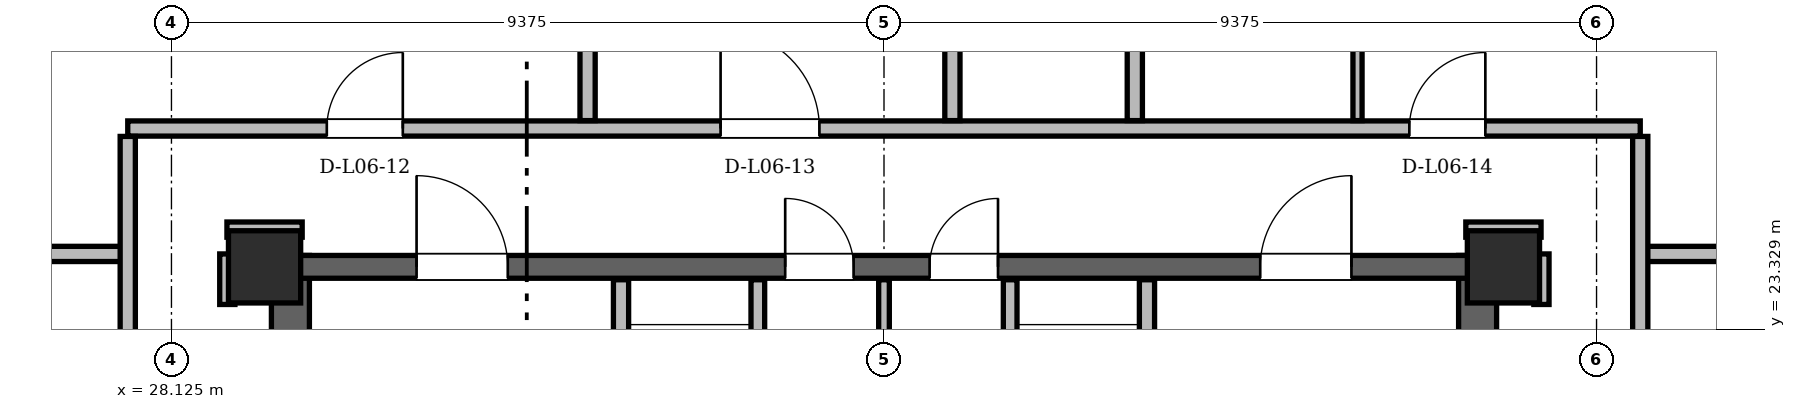
"""IFC4 building model, lengths in metres.
Left out: names, types, materials, properties, quantities, classifications, styles, units other than length and angle.
Written with IfcOpenShell. Run it as: python <this file> out.ifc"""

import sys

from ifc_helpers import new_model, si_unit, direction, frame, frame_2d, origin, origin_2d, place, context, subcontext, project, spatial, rectangle, hollow_rectangle, extrude, element, fill, save


model = new_model("IFC4")
c1 = context("Model", 3, precision=1e-05, world=origin(), true_north=direction((0.0, 1.0)))
c2 = subcontext(c1, "Body", "Model", "MODEL_VIEW")
j1 = project(units=[si_unit("LENGTHUNIT", "METRE"), si_unit("PLANEANGLEUNIT", "RADIAN")], contexts=[c1])
p1 = place(None, origin())
s1 = spatial("IfcSite", under=j1, at=p1, CompositionType="ELEMENT")
p2 = place(p1, origin())
s2 = spatial("IfcBuilding", under=s1, at=p2, CompositionType="ELEMENT")
p3 = place(p2, frame((0.0, 0.0, 27.3)))
s3 = spatial("IfcBuildingStorey", under=s2, at=p3, CompositionType="ELEMENT", Elevation=27.3)
for number, where, z_axis, x_axis in (
    (1, (45.65, 24.15, 0.0), (0.0, 0.0, 1.0), (1.0, 0.0, 0.0)),
    (2, (29.35, 24.15, 0.0), (0.0, 0.0, 1.0), (1.0, 0.0, 0.0)),
):
    element("IfcColumn", number, at=place(p3, frame(where, z_axis=z_axis, x_axis=x_axis)), inside=s3, PredefinedType="COLUMN", context=c2, shape_type="SweptSolid", body=[
        extrude(hollow_rectangle(XDim=0.95, YDim=0.95, WallThickness=0.08, at=origin_2d()), origin(), (0.0, 0.0, 1.0), 3.6),
    ])
for number, where, z_axis, x_axis in (
    (3, (29.69, 11.0, 0.0), (0.0, 0.0, 1.0), (0.0, 1.0, 0.0)),
    (4, (45.31, 11.0, 0.0), (0.0, 0.0, 1.0), (0.0, 1.0, 0.0)),
):
    element("IfcWall", number, at=place(p3, frame(where, z_axis=z_axis, x_axis=x_axis)), inside=s3, PredefinedType="SHEAR", context=c2, shape_type="SweptSolid", body=[
        extrude(rectangle(XDim=13.3, YDim=0.5, at=frame_2d((6.65, 0.0))), origin(), (0.0, 0.0, 1.0), 3.36),
    ])
p4 = place(p3, frame((29.65, 24.15, 0.0), z_axis=(0.0, 0.0, 1.0), x_axis=(1.0, 0.0, 0.0)))
e5 = element("IfcWall", 5, at=p4, inside=s3, PredefinedType="SHEAR", context=c2, shape_type="SweptSolid", body=[
    extrude(rectangle(XDim=15.7, YDim=0.3, at=frame_2d((7.85, 0.0))), origin(), (0.0, 0.0, 1.0), 3.36),
])
p5 = place(p4, frame((1.7, 0.0, 0.0)))
e6 = element("IfcOpeningElement", 6, at=p5, cuts=e5, PredefinedType="OPENING", context=c2, shape_type="SweptSolid", body=[
    extrude(rectangle(XDim=1.2, YDim=2.2, at=frame_2d((0.6, 1.1))), frame((0.0, 0.15, 0.0), z_axis=(0.0, -1.0, 0.0), x_axis=(1.0, 0.0, 0.0)), (0.0, 0.0, 1.0), 0.3),
])
p6 = place(p4, frame((12.8, 0.0, 0.0)))
e7 = element("IfcOpeningElement", 7, at=p6, cuts=e5, PredefinedType="OPENING", context=c2, shape_type="SweptSolid", body=[
    extrude(rectangle(XDim=1.2, YDim=2.2, at=frame_2d((0.6, 1.1))), frame((0.0, 0.15, 0.0), z_axis=(0.0, -1.0, 0.0), x_axis=(1.0, 0.0, 0.0)), (0.0, 0.0, 1.0), 0.3),
])
p7 = place(p4, frame((6.55, 0.0, 0.0)))
e8 = element("IfcOpeningElement", 8, at=p7, cuts=e5, PredefinedType="OPENING", context=c2, shape_type="SweptSolid", body=[
    extrude(rectangle(XDim=0.9, YDim=2.05, at=frame_2d((0.45, 1.025))), frame((0.0, 0.15, 0.0), z_axis=(0.0, -1.0, 0.0), x_axis=(1.0, 0.0, 0.0)), (0.0, 0.0, 1.0), 0.3),
])
p8 = place(p4, frame((8.45, 0.0, 0.0)))
e9 = element("IfcOpeningElement", 9, at=p8, cuts=e5, PredefinedType="OPENING", context=c2, shape_type="SweptSolid", body=[
    extrude(rectangle(XDim=0.9, YDim=2.05, at=frame_2d((0.45, 1.025))), frame((0.0, 0.15, 0.0), z_axis=(0.0, -1.0, 0.0), x_axis=(1.0, 0.0, 0.0)), (0.0, 0.0, 1.0), 0.3),
])
p9 = place(p3, frame((61.91, 15.3, 0.0), z_axis=(0.0, 0.0, 1.0), x_axis=(-0.50000660679, 0.866021589319, 0.0)))
e10 = element("IfcWall", 10, at=p9, inside=s3, PredefinedType="SOLIDWALL", context=c2, shape_type="SweptSolid", body=[
    extrude(rectangle(XDim=32.724, YDim=0.34, at=frame_2d((16.362, 0.0))), origin(), (0.0, 0.0, 1.0), 2.494),
])
p10 = place(p9, frame((1.6, 0.0, 0.0)))
e11 = element("IfcOpeningElement", 11, at=p10, cuts=e10, PredefinedType="OPENING", context=c2, shape_type="SweptSolid", body=[
    extrude(rectangle(XDim=1.6, YDim=2.2, at=frame_2d((0.8, 1.1))), frame((0.0, 0.17, 0.0), z_axis=(0.0, -1.0, 0.0), x_axis=(1.0, 0.0, 0.0)), (0.0, 0.0, 1.0), 0.34),
])
p11 = place(p9, frame((6.854, 0.0, 0.85)))
e12 = element("IfcOpeningElement", 12, at=p11, cuts=e10, PredefinedType="OPENING", context=c2, shape_type="SweptSolid", body=[
    extrude(rectangle(XDim=1.6, YDim=1.534, at=frame_2d((0.8, 0.767))), frame((0.0, 0.17, 0.0), z_axis=(0.0, -1.0, 0.0), x_axis=(1.0, 0.0, 0.0)), (0.0, 0.0, 1.0), 0.34),
])
p12 = place(p9, frame((13.853, 0.0, 0.85)))
e13 = element("IfcOpeningElement", 13, at=p12, cuts=e10, PredefinedType="OPENING", context=c2, shape_type="SweptSolid", body=[
    extrude(rectangle(XDim=2.0, YDim=1.534, at=frame_2d((1.0, 0.767))), frame((0.0, 0.17, 0.0), z_axis=(0.0, -1.0, 0.0), x_axis=(1.0, 0.0, 0.0)), (0.0, 0.0, 1.0), 0.34),
])
p13 = place(p9, frame((28.387, 0.0, 0.85)))
e14 = element("IfcOpeningElement", 14, at=p13, cuts=e10, PredefinedType="OPENING", context=c2, shape_type="SweptSolid", body=[
    extrude(rectangle(XDim=1.4, YDim=1.534, at=frame_2d((0.7, 0.767))), frame((0.0, 0.17, 0.0), z_axis=(0.0, -1.0, 0.0), x_axis=(1.0, 0.0, 0.0)), (0.0, 0.0, 1.0), 0.34),
])
p14 = place(p9, frame((0.589, 0.0, 0.85)))
e15 = element("IfcOpeningElement", 15, at=p14, cuts=e10, PredefinedType="OPENING", context=c2, shape_type="SweptSolid", body=[
    extrude(rectangle(XDim=0.9, YDim=1.15, at=frame_2d((0.45, 0.575))), frame((0.0, 0.17, 0.0), z_axis=(0.0, -1.0, 0.0), x_axis=(1.0, 0.0, 0.0)), (0.0, 0.0, 1.0), 0.34),
])
p15 = place(p3, frame((29.452, 43.64, 0.0), z_axis=(0.0, 0.0, 1.0), x_axis=(-0.50000660679, -0.866021589319, 0.0)))
e16 = element("IfcWall", 16, at=p15, inside=s3, PredefinedType="SOLIDWALL", context=c2, shape_type="SweptSolid", body=[
    extrude(rectangle(XDim=32.724, YDim=0.34, at=frame_2d((16.362, 0.0))), origin(), (0.0, 0.0, 1.0), 2.494),
])
p16 = place(p15, frame((2.05, 0.0, 0.0)))
e17 = element("IfcOpeningElement", 17, at=p16, cuts=e16, PredefinedType="OPENING", context=c2, shape_type="SweptSolid", body=[
    extrude(rectangle(XDim=1.6, YDim=2.2, at=frame_2d((0.8, 1.1))), frame((0.0, 0.17, 0.0), z_axis=(0.0, -1.0, 0.0), x_axis=(1.0, 0.0, 0.0)), (0.0, 0.0, 1.0), 0.34),
])
p17 = place(p15, frame((24.19, 0.0, 0.85)))
e18 = element("IfcOpeningElement", 18, at=p17, cuts=e16, PredefinedType="OPENING", context=c2, shape_type="SweptSolid", body=[
    extrude(rectangle(XDim=1.2, YDim=1.48, at=frame_2d((0.6, 0.74))), frame((0.0, 0.17, 0.0), z_axis=(0.0, -1.0, 0.0), x_axis=(1.0, 0.0, 0.0)), (0.0, 0.0, 1.0), 0.34),
])
p18 = place(p15, frame((29.073, 0.0, 0.85)))
e19 = element("IfcOpeningElement", 19, at=p18, cuts=e16, PredefinedType="OPENING", context=c2, shape_type="SweptSolid", body=[
    extrude(rectangle(XDim=2.4, YDim=1.534, at=frame_2d((1.2, 0.767))), frame((0.0, 0.17, 0.0), z_axis=(0.0, -1.0, 0.0), x_axis=(1.0, 0.0, 0.0)), (0.0, 0.0, 1.0), 0.34),
])
p19 = place(p15, frame((10.766, 0.0, 0.85)))
e20 = element("IfcOpeningElement", 20, at=p19, cuts=e16, PredefinedType="OPENING", context=c2, shape_type="SweptSolid", body=[
    extrude(rectangle(XDim=2.5, YDim=1.534, at=frame_2d((1.25, 0.767))), frame((0.0, 0.17, 0.0), z_axis=(0.0, -1.0, 0.0), x_axis=(1.0, 0.0, 0.0)), (0.0, 0.0, 1.0), 0.34),
])
p20 = place(p15, frame((17.741, 0.0, 0.85)))
e21 = element("IfcOpeningElement", 21, at=p20, cuts=e16, PredefinedType="OPENING", context=c2, shape_type="SweptSolid", body=[
    extrude(rectangle(XDim=2.4, YDim=1.534, at=frame_2d((1.2, 0.767))), frame((0.0, 0.17, 0.0), z_axis=(0.0, -1.0, 0.0), x_axis=(1.0, 0.0, 0.0)), (0.0, 0.0, 1.0), 0.34),
])
p21 = place(p15, frame((0.759, 0.0, 0.85)))
e22 = element("IfcOpeningElement", 22, at=p21, cuts=e16, PredefinedType="OPENING", context=c2, shape_type="SweptSolid", body=[
    extrude(rectangle(XDim=1.2, YDim=1.48, at=frame_2d((0.6, 0.74))), frame((0.0, 0.17, 0.0), z_axis=(0.0, -1.0, 0.0), x_axis=(1.0, 0.0, 0.0)), (0.0, 0.0, 1.0), 0.34),
])
p22 = place(p3, frame((34.04, 19.48, 0.0), z_axis=(0.0, 0.0, 1.0), x_axis=(0.0, 1.0, 0.0)))
e23 = element("IfcWall", 23, at=p22, inside=s3, PredefinedType="PARTITIONING", context=c2, shape_type="SweptSolid", body=[
    extrude(rectangle(XDim=4.5, YDim=0.2, at=frame_2d((2.25, 0.0))), origin(), (0.0, 0.0, 1.0), 2.4),
])
p23 = place(p22, frame((2.12, 0.0, 0.0)))
e24 = element("IfcOpeningElement", 24, at=p23, cuts=e23, PredefinedType="OPENING", context=c2, shape_type="SweptSolid", body=[
    extrude(rectangle(XDim=1.1, YDim=2.2, at=frame_2d((0.55, 1.1))), frame((0.0, 0.1, 0.0), z_axis=(0.0, -1.0, 0.0), x_axis=(1.0, 0.0, 0.0)), (0.0, 0.0, 1.0), 0.2),
])
p24 = place(p3, frame((35.84, 20.96, 0.0), z_axis=(0.0, 0.0, 1.0), x_axis=(0.0, 1.0, 0.0)))
e25 = element("IfcWall", 25, at=p24, inside=s3, PredefinedType="PARTITIONING", context=c2, shape_type="SweptSolid", body=[
    extrude(rectangle(XDim=3.02, YDim=0.18, at=frame_2d((1.51, 0.0))), origin(), (0.0, 0.0, 1.0), 2.4),
])
p25 = place(p3, frame((40.96, 19.48, 0.0), z_axis=(0.0, 0.0, 1.0), x_axis=(0.0, 1.0, 0.0)))
e26 = element("IfcWall", 26, at=p25, inside=s3, PredefinedType="PARTITIONING", context=c2, shape_type="SweptSolid", body=[
    extrude(rectangle(XDim=4.5, YDim=0.2, at=frame_2d((2.25, 0.0))), origin(), (0.0, 0.0, 1.0), 2.4),
])
p26 = place(p25, frame((2.12, 0.0, 0.0)))
e27 = element("IfcOpeningElement", 27, at=p26, cuts=e26, PredefinedType="OPENING", context=c2, shape_type="SweptSolid", body=[
    extrude(rectangle(XDim=1.1, YDim=2.2, at=frame_2d((0.55, 1.1))), frame((0.0, 0.1, 0.0), z_axis=(0.0, -1.0, 0.0), x_axis=(1.0, 0.0, 0.0)), (0.0, 0.0, 1.0), 0.2),
])
p27 = place(p3, frame((39.16, 20.96, 0.0), z_axis=(0.0, 0.0, 1.0), x_axis=(0.0, 1.0, 0.0)))
e28 = element("IfcWall", 28, at=p27, inside=s3, PredefinedType="PARTITIONING", context=c2, shape_type="SweptSolid", body=[
    extrude(rectangle(XDim=3.02, YDim=0.18, at=frame_2d((1.51, 0.0))), origin(), (0.0, 0.0, 1.0), 2.4),
])
p28 = place(p3, frame((37.5, 21.06, 0.0), z_axis=(0.0, 0.0, 1.0), x_axis=(0.0, 1.0, 0.0)))
e29 = element("IfcWall", 29, at=p28, inside=s3, PredefinedType="PARTITIONING", context=c2, shape_type="SweptSolid", body=[
    extrude(rectangle(XDim=2.92, YDim=0.14, at=frame_2d((1.46, 0.0))), origin(), (0.0, 0.0, 1.0), 2.4),
])
for number, where, z_axis, x_axis in (
    (30, (18.498, 24.32, 0.0), (0.0, 0.0, 1.0), (1.0, 0.0, 0.0)),
    (31, (47.45, 24.32, 0.0), (0.0, 0.0, 1.0), (1.0, 0.0, 0.0)),
):
    element("IfcWall", number, at=place(p3, frame(where, z_axis=z_axis, x_axis=x_axis)), inside=s3, PredefinedType="PARTITIONING", context=c2, shape_type="SweptSolid", body=[
        extrude(rectangle(XDim=9.052, YDim=0.2, at=frame_2d((4.526, 0.0))), origin(), (0.0, 0.0, 1.0), 2.494),
    ])
for number, where, z_axis, x_axis in (
    (32, (28.855, 24.64, 0.0), (0.0, 0.0, 1.0), (1.0, 0.0, 0.0)),
    (33, (45.155, 24.64, 0.0), (0.0, 0.0, 1.0), (1.0, 0.0, 0.0)),
):
    element("IfcWall", number, at=place(p3, frame(where, z_axis=z_axis, x_axis=x_axis)), inside=s3, PredefinedType="PARTITIONING", context=c2, shape_type="SweptSolid", body=[
        extrude(rectangle(XDim=0.99, YDim=0.2, at=frame_2d((0.495, 0.0))), origin(), (0.0, 0.0, 1.0), 2.738),
    ])
p29 = place(p3, frame((27.55, 25.97, 0.0), z_axis=(0.0, 0.0, 1.0), x_axis=(1.0, 0.0, 0.0)))
e34 = element("IfcWall", 34, at=p29, inside=s3, PredefinedType="PARTITIONING", context=c2, shape_type="SweptSolid", body=[
    extrude(rectangle(XDim=19.9, YDim=0.2, at=frame_2d((9.95, 0.0))), origin(), (0.0, 0.0, 1.0), 2.738),
])
p30 = place(p29, frame((2.619, 0.0, 0.0)))
e35 = element("IfcOpeningElement", 35, at=p30, cuts=e34, PredefinedType="OPENING", context=c2, shape_type="SweptSolid", body=[
    extrude(rectangle(XDim=1.0, YDim=2.18, at=frame_2d((0.5, 1.09))), frame((0.0, 0.1, 0.0), z_axis=(0.0, -1.0, 0.0), x_axis=(1.0, 0.0, 0.0)), (0.0, 0.0, 1.0), 0.2),
])
p31 = place(p29, frame((7.8, 0.0, 0.0)))
e36 = element("IfcOpeningElement", 36, at=p31, cuts=e34, PredefinedType="OPENING", context=c2, shape_type="SweptSolid", body=[
    extrude(rectangle(XDim=1.3, YDim=2.2, at=frame_2d((0.65, 1.1))), frame((0.0, 0.1, 0.0), z_axis=(0.0, -1.0, 0.0), x_axis=(1.0, 0.0, 0.0)), (0.0, 0.0, 1.0), 0.2),
])
p32 = place(p29, frame((16.862, 0.0, 0.0)))
e37 = element("IfcOpeningElement", 37, at=p32, cuts=e34, PredefinedType="OPENING", context=c2, shape_type="SweptSolid", body=[
    extrude(rectangle(XDim=1.0, YDim=2.18, at=frame_2d((0.5, 1.09))), frame((0.0, 0.1, 0.0), z_axis=(0.0, -1.0, 0.0), x_axis=(1.0, 0.0, 0.0)), (0.0, 0.0, 1.0), 0.2),
])
p33 = place(p3, frame((27.55, 11.054, 0.0), z_axis=(0.0, 0.0, 1.0), x_axis=(0.0, 1.0, 0.0)))
e38 = element("IfcWall", 38, at=p33, inside=s3, PredefinedType="PARTITIONING", context=c2, shape_type="SweptSolid", body=[
    extrude(rectangle(XDim=14.812, YDim=0.2, at=frame_2d((7.406, 0.0))), origin(), (0.0, 0.0, 1.0), 2.738),
])
p34 = place(p33, frame((8.541, 0.0, 0.0)))
e39 = element("IfcOpeningElement", 39, at=p34, cuts=e38, PredefinedType="OPENING", context=c2, shape_type="SweptSolid", body=[
    extrude(rectangle(XDim=1.0, YDim=2.18, at=frame_2d((0.5, 1.09))), frame((0.0, 0.1, 0.0), z_axis=(0.0, -1.0, 0.0), x_axis=(1.0, 0.0, 0.0)), (0.0, 0.0, 1.0), 0.2),
])
p35 = place(p3, frame((28.86, 23.655, 0.0), z_axis=(0.0, 0.0, 1.0), x_axis=(0.0, 1.0, 0.0)))
e40 = element("IfcWall", 40, at=p35, inside=s3, PredefinedType="PARTITIONING", context=c2, shape_type="SweptSolid", body=[
    extrude(rectangle(XDim=0.665, YDim=0.2, at=frame_2d((0.333, 0.0))), origin(), (0.0, 0.0, 1.0), 3.36),
])
for number, where, z_axis, x_axis in (
    (41, (33.6, 26.074, 0.0), (0.0, 0.0, 1.0), (0.0, 1.0, 0.0)),
    (42, (38.4, 26.074, 0.0), (0.0, 0.0, 1.0), (0.0, 1.0, 0.0)),
):
    element("IfcWall", number, at=place(p3, frame(where, z_axis=z_axis, x_axis=x_axis)), inside=s3, PredefinedType="PARTITIONING", context=c2, shape_type="SweptSolid", body=[
        extrude(rectangle(XDim=4.292, YDim=0.2, at=frame_2d((2.146, 0.0))), origin(), (0.0, 0.0, 1.0), 3.36),
    ])
p36 = place(p3, frame((40.8, 26.074, 0.0), z_axis=(0.0, 0.0, 1.0), x_axis=(0.0, 1.0, 0.0)))
e43 = element("IfcWall", 43, at=p36, inside=s3, PredefinedType="PARTITIONING", context=c2, shape_type="SweptSolid", body=[
    extrude(rectangle(XDim=17.392, YDim=0.2, at=frame_2d((8.696, 0.0))), origin(), (0.0, 0.0, 1.0), 3.36),
])
p37 = place(p3, frame((43.73, 26.074, 0.0), z_axis=(0.0, 0.0, 1.0), x_axis=(0.0, 1.0, 0.0)))
e44 = element("IfcWall", 44, at=p37, inside=s3, PredefinedType="PARTITIONING", context=c2, shape_type="SweptSolid", body=[
    extrude(rectangle(XDim=17.392, YDim=0.12, at=frame_2d((8.696, 0.0))), origin(), (0.0, 0.0, 1.0), 3.36),
])
p38 = place(p37, frame((1.294, 0.0, 0.0)))
e45 = element("IfcOpeningElement", 45, at=p38, cuts=e44, PredefinedType="OPENING", context=c2, shape_type="SweptSolid", body=[
    extrude(rectangle(XDim=0.92, YDim=2.12, at=frame_2d((0.46, 1.06))), frame((0.0, 0.06, 0.0), z_axis=(0.0, -1.0, 0.0), x_axis=(1.0, 0.0, 0.0)), (0.0, 0.0, 1.0), 0.12),
])
p39 = place(p37, frame((4.943, 0.0, 0.0)))
e46 = element("IfcOpeningElement", 46, at=p39, cuts=e44, PredefinedType="OPENING", context=c2, shape_type="SweptSolid", body=[
    extrude(rectangle(XDim=0.92, YDim=2.12, at=frame_2d((0.46, 1.06))), frame((0.0, 0.06, 0.0), z_axis=(0.0, -1.0, 0.0), x_axis=(1.0, 0.0, 0.0)), (0.0, 0.0, 1.0), 0.12),
])
p40 = place(p37, frame((8.074, 0.0, 0.0)))
e47 = element("IfcOpeningElement", 47, at=p40, cuts=e44, PredefinedType="OPENING", context=c2, shape_type="SweptSolid", body=[
    extrude(rectangle(XDim=0.95, YDim=2.1, at=frame_2d((0.475, 1.05))), frame((0.0, 0.06, 0.0), z_axis=(0.0, -1.0, 0.0), x_axis=(1.0, 0.0, 0.0)), (0.0, 0.0, 1.0), 0.12),
])
p41 = place(p37, frame((10.717, 0.0, 0.0)))
e48 = element("IfcOpeningElement", 48, at=p41, cuts=e44, PredefinedType="OPENING", context=c2, shape_type="SweptSolid", body=[
    extrude(rectangle(XDim=0.95, YDim=2.1, at=frame_2d((0.475, 1.05))), frame((0.0, 0.06, 0.0), z_axis=(0.0, -1.0, 0.0), x_axis=(1.0, 0.0, 0.0)), (0.0, 0.0, 1.0), 0.12),
])
p42 = place(p37, frame((13.501, 0.0, 0.0)))
e49 = element("IfcOpeningElement", 49, at=p42, cuts=e44, PredefinedType="OPENING", context=c2, shape_type="SweptSolid", body=[
    extrude(rectangle(XDim=0.95, YDim=2.1, at=frame_2d((0.475, 1.05))), frame((0.0, 0.06, 0.0), z_axis=(0.0, -1.0, 0.0), x_axis=(1.0, 0.0, 0.0)), (0.0, 0.0, 1.0), 0.12),
])
p43 = place(p37, frame((16.033, 0.0, 0.0)))
e50 = element("IfcOpeningElement", 50, at=p43, cuts=e44, PredefinedType="OPENING", context=c2, shape_type="SweptSolid", body=[
    extrude(rectangle(XDim=0.88, YDim=2.08, at=frame_2d((0.44, 1.04))), frame((0.0, 0.06, 0.0), z_axis=(0.0, -1.0, 0.0), x_axis=(1.0, 0.0, 0.0)), (0.0, 0.0, 1.0), 0.12),
])
p44 = place(p3, frame((46.15, 23.655, 0.0), z_axis=(0.0, 0.0, 1.0), x_axis=(0.0, 1.0, 0.0)))
e51 = element("IfcWall", 51, at=p44, inside=s3, PredefinedType="PARTITIONING", context=c2, shape_type="SweptSolid", body=[
    extrude(rectangle(XDim=0.665, YDim=0.2, at=frame_2d((0.333, 0.0))), origin(), (0.0, 0.0, 1.0), 3.36),
])
p45 = place(p3, frame((47.45, 11.054, 0.0), z_axis=(0.0, 0.0, 1.0), x_axis=(0.0, 1.0, 0.0)))
e52 = element("IfcWall", 52, at=p45, inside=s3, PredefinedType="PARTITIONING", context=c2, shape_type="SweptSolid", body=[
    extrude(rectangle(XDim=14.812, YDim=0.2, at=frame_2d((7.406, 0.0))), origin(), (0.0, 0.0, 1.0), 2.738),
])
p46 = place(p45, frame((8.541, 0.0, 0.0)))
e53 = element("IfcOpeningElement", 53, at=p46, cuts=e52, PredefinedType="OPENING", context=c2, shape_type="SweptSolid", body=[
    extrude(rectangle(XDim=1.0, YDim=2.18, at=frame_2d((0.5, 1.09))), frame((0.0, 0.1, 0.0), z_axis=(0.0, -1.0, 0.0), x_axis=(1.0, 0.0, 0.0)), (0.0, 0.0, 1.0), 0.2),
])
p47 = place(p5, origin())
e54 = element("IfcDoor", 54, at=p47, inside=s3, OperationType="SINGLE_SWING_LEFT", PredefinedType="DOOR", context=c2, shape_type="SweptSolid", body=[
    extrude(rectangle(XDim=1.2, YDim=2.2, at=frame_2d((0.6, 1.1))), frame((0.0, 0.025, 0.0), z_axis=(0.0, -1.0, 0.0), x_axis=(1.0, 0.0, 0.0)), (0.0, 0.0, 1.0), 0.05),
])
fill(e6, e54)
p48 = place(p6, origin())
e55 = element("IfcDoor", 55, at=p48, inside=s3, OperationType="SINGLE_SWING_RIGHT", PredefinedType="DOOR", context=c2, shape_type="SweptSolid", body=[
    extrude(rectangle(XDim=1.2, YDim=2.2, at=frame_2d((0.6, 1.1))), frame((0.0, 0.025, 0.0), z_axis=(0.0, -1.0, 0.0), x_axis=(1.0, 0.0, 0.0)), (0.0, 0.0, 1.0), 0.05),
])
fill(e7, e55)
p49 = place(p7, origin())
e56 = element("IfcDoor", 56, at=p49, inside=s3, OperationType="SINGLE_SWING_LEFT", PredefinedType="DOOR", context=c2, shape_type="SweptSolid", body=[
    extrude(rectangle(XDim=0.9, YDim=2.05, at=frame_2d((0.45, 1.025))), frame((0.0, 0.025, 0.0), z_axis=(0.0, -1.0, 0.0), x_axis=(1.0, 0.0, 0.0)), (0.0, 0.0, 1.0), 0.05),
])
fill(e8, e56)
p50 = place(p8, origin())
e57 = element("IfcDoor", 57, at=p50, inside=s3, OperationType="SINGLE_SWING_RIGHT", PredefinedType="DOOR", context=c2, shape_type="SweptSolid", body=[
    extrude(rectangle(XDim=0.9, YDim=2.05, at=frame_2d((0.45, 1.025))), frame((0.0, 0.025, 0.0), z_axis=(0.0, -1.0, 0.0), x_axis=(1.0, 0.0, 0.0)), (0.0, 0.0, 1.0), 0.05),
])
fill(e9, e57)
p51 = place(p30, origin())
e58 = element("IfcDoor", 58, at=p51, inside=s3, OperationType="SINGLE_SWING_RIGHT", PredefinedType="DOOR", context=c2, shape_type="SweptSolid", body=[
    extrude(rectangle(XDim=1.0, YDim=2.18, at=frame_2d((0.5, 1.09))), frame((0.0, 0.025, 0.0), z_axis=(0.0, -1.0, 0.0), x_axis=(1.0, 0.0, 0.0)), (0.0, 0.0, 1.0), 0.05),
])
fill(e35, e58)
p52 = place(p31, origin())
e59 = element("IfcDoor", 59, at=p52, inside=s3, OperationType="SINGLE_SWING_LEFT", PredefinedType="DOOR", context=c2, shape_type="SweptSolid", body=[
    extrude(rectangle(XDim=1.3, YDim=2.2, at=frame_2d((0.65, 1.1))), frame((0.0, 0.025, 0.0), z_axis=(0.0, -1.0, 0.0), x_axis=(1.0, 0.0, 0.0)), (0.0, 0.0, 1.0), 0.05),
])
fill(e36, e59)
p53 = place(p32, origin())
e60 = element("IfcDoor", 60, at=p53, inside=s3, OperationType="SINGLE_SWING_RIGHT", PredefinedType="DOOR", context=c2, shape_type="SweptSolid", body=[
    extrude(rectangle(XDim=1.0, YDim=2.18, at=frame_2d((0.5, 1.09))), frame((0.0, 0.025, 0.0), z_axis=(0.0, -1.0, 0.0), x_axis=(1.0, 0.0, 0.0)), (0.0, 0.0, 1.0), 0.05),
])
fill(e37, e60)
save(model, sys.argv[1])
